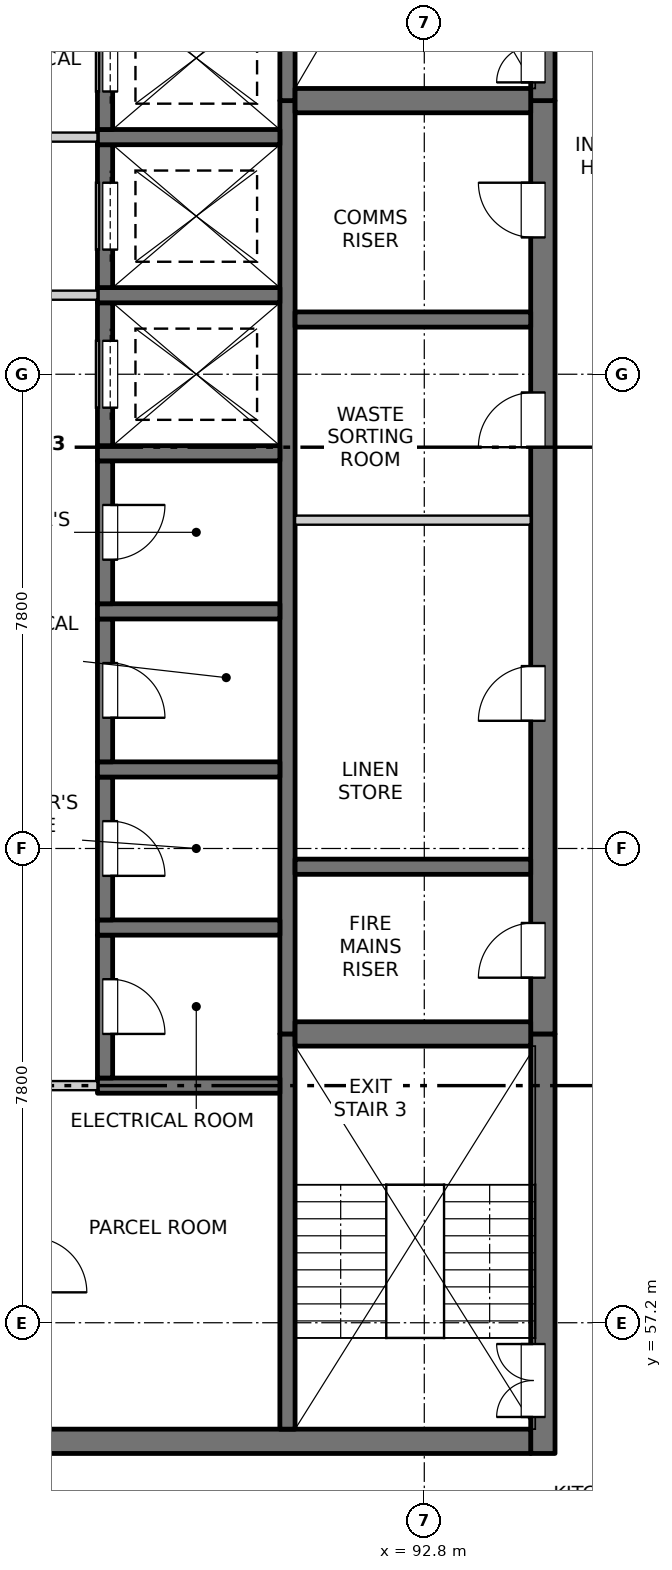
"""IFC4 building model, lengths in metres.
Left out: names, types, materials, properties, quantities, classifications, styles, units other than length and angle.
Written with IfcOpenShell. Run it as: python <this file> out.ifc"""

import sys

from ifc_helpers import new_model, si_unit, direction, frame, frame_2d, origin, place, context, subcontext, project, spatial, rectangle, extrude, element, fill, save


model = new_model("IFC4")
c1 = context("Model", 3, precision=1e-05, world=origin(), true_north=direction((0.0, 1.0)))
c2 = subcontext(c1, "Body", "Model", "MODEL_VIEW")
j1 = project(units=[si_unit("LENGTHUNIT", "METRE"), si_unit("PLANEANGLEUNIT", "RADIAN")], contexts=[c1])
p1 = place(None, origin())
s1 = spatial("IfcSite", under=j1, at=p1, CompositionType="ELEMENT")
p2 = place(p1, origin())
s2 = spatial("IfcBuilding", under=s1, at=p2, CompositionType="ELEMENT")
p3 = place(p2, frame((0.0, 0.0, 204.1)))
s3 = spatial("IfcBuildingStorey", under=s2, at=p3, CompositionType="ELEMENT", Elevation=204.1)
p4 = place(p3, frame((94.75, 55.05, -0.25), z_axis=(0.0, 0.0, 1.0), x_axis=(0.0, 1.0, 0.0)))
e1 = element("IfcWall", 1, at=p4, inside=s3, PredefinedType="SOLIDWALL", context=c2, shape_type="SweptSolid", body=[
    extrude(rectangle(XDim=6.9, YDim=0.4, at=frame_2d((3.45, 0.0))), origin(), (0.0, 0.0, 1.0), 3.4),
])
p5 = place(p4, frame((0.6, 0.0, 0.25)))
e2 = element("IfcOpeningElement", 2, at=p5, cuts=e1, PredefinedType="OPENING", context=c2, shape_type="SweptSolid", body=[
    extrude(rectangle(XDim=1.2, YDim=2.1, at=frame_2d((0.6, 1.05))), frame((0.0, 0.21, 0.0), z_axis=(0.0, -1.0, 0.0), x_axis=(1.0, 0.0, 0.0)), (0.0, 0.0, 1.0), 0.42),
])
p6 = place(p3, frame((94.75, 61.95, -0.25), z_axis=(0.0, 0.0, 1.0), x_axis=(0.0, 1.0, 0.0)))
e3 = element("IfcWall", 3, at=p6, inside=s3, PredefinedType="SOLIDWALL", context=c2, shape_type="SweptSolid", body=[
    extrude(rectangle(XDim=15.35, YDim=0.4, at=frame_2d((7.675, 0.0))), origin(), (0.0, 0.0, 1.0), 3.4),
])
p7 = place(p6, frame((0.925, 0.0, 0.25)))
e4 = element("IfcOpeningElement", 4, at=p7, cuts=e3, PredefinedType="OPENING", context=c2, shape_type="SweptSolid", body=[
    extrude(rectangle(XDim=0.9, YDim=2.1, at=frame_2d((0.45, 1.05))), frame((0.0, 0.21, 0.0), z_axis=(0.0, -1.0, 0.0), x_axis=(1.0, 0.0, 0.0)), (0.0, 0.0, 1.0), 0.42),
])
p8 = place(p6, frame((5.15, 0.0, 0.25)))
e5 = element("IfcOpeningElement", 5, at=p8, cuts=e3, PredefinedType="OPENING", context=c2, shape_type="SweptSolid", body=[
    extrude(rectangle(XDim=0.9, YDim=2.1, at=frame_2d((0.45, 1.05))), frame((0.0, 0.21, 0.0), z_axis=(0.0, -1.0, 0.0), x_axis=(1.0, 0.0, 0.0)), (0.0, 0.0, 1.0), 0.42),
])
p9 = place(p6, frame((9.65, 0.0, 0.25)))
e6 = element("IfcOpeningElement", 6, at=p9, cuts=e3, PredefinedType="OPENING", context=c2, shape_type="SweptSolid", body=[
    extrude(rectangle(XDim=0.9, YDim=2.1, at=frame_2d((0.45, 1.05))), frame((0.0, 0.21, 0.0), z_axis=(0.0, -1.0, 0.0), x_axis=(1.0, 0.0, 0.0)), (0.0, 0.0, 1.0), 0.42),
])
p10 = place(p6, frame((13.1, 0.0, 0.25)))
e7 = element("IfcOpeningElement", 7, at=p10, cuts=e3, PredefinedType="OPENING", context=c2, shape_type="SweptSolid", body=[
    extrude(rectangle(XDim=0.9, YDim=2.1, at=frame_2d((0.45, 1.05))), frame((0.0, 0.21, 0.0), z_axis=(0.0, -1.0, 0.0), x_axis=(1.0, 0.0, 0.0)), (0.0, 0.0, 1.0), 0.42),
])
p11 = place(p3, frame((94.75, 77.3, -0.25), z_axis=(0.0, 0.0, 1.0), x_axis=(0.0, 1.0, 0.0)))
e8 = element("IfcWall", 8, at=p11, inside=s3, PredefinedType="SOLIDWALL", context=c2, shape_type="SweptSolid", body=[
    extrude(rectangle(XDim=7.4, YDim=0.4, at=frame_2d((3.7, 0.0))), origin(), (0.0, 0.0, 1.0), 3.4),
])
p12 = place(p11, frame((0.3, 0.0, 0.25)))
e9 = element("IfcOpeningElement", 9, at=p12, cuts=e8, PredefinedType="OPENING", context=c2, shape_type="SweptSolid", body=[
    extrude(rectangle(XDim=1.2, YDim=2.1, at=frame_2d((0.6, 1.05))), frame((0.0, 0.21, 0.0), z_axis=(0.0, -1.0, 0.0), x_axis=(1.0, 0.0, 0.0)), (0.0, 0.0, 1.0), 0.42),
])
p13 = place(p3, frame((75.45, 55.25, -0.25), z_axis=(0.0, 0.0, 1.0), x_axis=(1.0, 0.0, 0.0)))
e10 = element("IfcWall", 10, at=p13, inside=s3, PredefinedType="SOLIDWALL", context=c2, shape_type="SweptSolid", body=[
    extrude(rectangle(XDim=19.1, YDim=0.4, at=frame_2d((9.55, 0.0))), origin(), (0.0, 0.0, 1.0), 3.4),
])
p14 = place(p13, frame((8.8, 0.0, 0.25)))
e11 = element("IfcOpeningElement", 11, at=p14, cuts=e10, PredefinedType="OPENING", context=c2, shape_type="SweptSolid", body=[
    extrude(rectangle(XDim=1.5, YDim=2.1, at=frame_2d((0.75, 1.05))), frame((0.0, 0.21, 0.0), z_axis=(0.0, -1.0, 0.0), x_axis=(1.0, 0.0, 0.0)), (0.0, 0.0, 1.0), 0.42),
])
p15 = place(p3, frame((90.55, 55.45, -0.25), z_axis=(0.0, 0.0, 1.0), x_axis=(0.0, 1.0, 0.0)))
e12 = element("IfcWall", 12, at=p15, inside=s3, PredefinedType="SOLIDWALL", context=c2, shape_type="SweptSolid", body=[
    extrude(rectangle(XDim=6.5, YDim=0.25, at=frame_2d((3.25, 0.0))), origin(), (0.0, 0.0, 1.0), 3.4),
])
p16 = place(p3, frame((90.55, 61.95, -0.25), z_axis=(0.0, 0.0, 1.0), x_axis=(0.0, 1.0, 0.0)))
e13 = element("IfcWall", 13, at=p16, inside=s3, PredefinedType="SOLIDWALL", context=c2, shape_type="SweptSolid", body=[
    extrude(rectangle(XDim=15.35, YDim=0.25, at=frame_2d((7.675, 0.0))), origin(), (0.0, 0.0, 1.0), 3.4),
])
p17 = place(p3, frame((90.55, 77.3, -0.25), z_axis=(0.0, 0.0, 1.0), x_axis=(0.0, 1.0, 0.0)))
e14 = element("IfcWall", 14, at=p17, inside=s3, PredefinedType="SOLIDWALL", context=c2, shape_type="SweptSolid", body=[
    extrude(rectangle(XDim=7.0, YDim=0.25, at=frame_2d((3.5, 0.0))), origin(), (0.0, 0.0, 1.0), 3.4),
])
p18 = place(p3, frame((87.425, 61.1, -0.25), z_axis=(0.0, 0.0, 1.0), x_axis=(1.0, 0.0, 0.0)))
e15 = element("IfcWall", 15, at=p18, inside=s3, PredefinedType="SOLIDWALL", context=c2, shape_type="SweptSolid", body=[
    extrude(rectangle(XDim=3.0, YDim=0.25, at=frame_2d((1.5, 0.0))), origin(), (0.0, 0.0, 1.0), 3.4),
])
p19 = place(p3, frame((87.55, 61.225, -0.25), z_axis=(0.0, 0.0, 1.0), x_axis=(0.0, 1.0, 0.0)))
e16 = element("IfcWall", 16, at=p19, inside=s3, PredefinedType="SOLIDWALL", context=c2, shape_type="SweptSolid", body=[
    extrude(rectangle(XDim=2.35, YDim=0.25, at=frame_2d((1.175, 0.0))), origin(), (0.0, 0.0, 1.0), 3.4),
])
p20 = place(p19, frame((0.725, 0.0, 0.25)))
e17 = element("IfcOpeningElement", 17, at=p20, cuts=e16, PredefinedType="OPENING", context=c2, shape_type="SweptSolid", body=[
    extrude(rectangle(XDim=0.9, YDim=2.1, at=frame_2d((0.45, 1.05))), frame((0.0, 0.135, 0.0), z_axis=(0.0, -1.0, 0.0), x_axis=(1.0, 0.0, 0.0)), (0.0, 0.0, 1.0), 0.27),
])
p21 = place(p3, frame((87.425, 63.7, -0.25), z_axis=(0.0, 0.0, 1.0), x_axis=(1.0, 0.0, 0.0)))
e18 = element("IfcWall", 18, at=p21, inside=s3, PredefinedType="SOLIDWALL", context=c2, shape_type="SweptSolid", body=[
    extrude(rectangle(XDim=3.0, YDim=0.25, at=frame_2d((1.5, 0.0))), origin(), (0.0, 0.0, 1.0), 3.4),
])
p22 = place(p3, frame((87.55, 63.825, -0.25), z_axis=(0.0, 0.0, 1.0), x_axis=(0.0, 1.0, 0.0)))
e19 = element("IfcWall", 19, at=p22, inside=s3, PredefinedType="SOLIDWALL", context=c2, shape_type="SweptSolid", body=[
    extrude(rectangle(XDim=2.35, YDim=0.25, at=frame_2d((1.175, 0.0))), origin(), (0.0, 0.0, 1.0), 3.4),
])
p23 = place(p22, frame((0.725, 0.0, 0.25)))
e20 = element("IfcOpeningElement", 20, at=p23, cuts=e19, PredefinedType="OPENING", context=c2, shape_type="SweptSolid", body=[
    extrude(rectangle(XDim=0.9, YDim=2.1, at=frame_2d((0.45, 1.05))), frame((0.0, 0.135, 0.0), z_axis=(0.0, -1.0, 0.0), x_axis=(1.0, 0.0, 0.0)), (0.0, 0.0, 1.0), 0.27),
])
p24 = place(p3, frame((87.425, 66.3, -0.25), z_axis=(0.0, 0.0, 1.0), x_axis=(1.0, 0.0, 0.0)))
e21 = element("IfcWall", 21, at=p24, inside=s3, PredefinedType="SOLIDWALL", context=c2, shape_type="SweptSolid", body=[
    extrude(rectangle(XDim=3.0, YDim=0.25, at=frame_2d((1.5, 0.0))), origin(), (0.0, 0.0, 1.0), 3.4),
])
p25 = place(p3, frame((87.55, 66.425, -0.25), z_axis=(0.0, 0.0, 1.0), x_axis=(0.0, 1.0, 0.0)))
e22 = element("IfcWall", 22, at=p25, inside=s3, PredefinedType="SOLIDWALL", context=c2, shape_type="SweptSolid", body=[
    extrude(rectangle(XDim=2.35, YDim=0.25, at=frame_2d((1.175, 0.0))), origin(), (0.0, 0.0, 1.0), 3.4),
])
p26 = place(p25, frame((0.725, 0.0, 0.25)))
e23 = element("IfcOpeningElement", 23, at=p26, cuts=e22, PredefinedType="OPENING", context=c2, shape_type="SweptSolid", body=[
    extrude(rectangle(XDim=0.9, YDim=2.1, at=frame_2d((0.45, 1.05))), frame((0.0, 0.135, 0.0), z_axis=(0.0, -1.0, 0.0), x_axis=(1.0, 0.0, 0.0)), (0.0, 0.0, 1.0), 0.27),
])
p27 = place(p3, frame((87.425, 68.9, -0.25), z_axis=(0.0, 0.0, 1.0), x_axis=(1.0, 0.0, 0.0)))
e24 = element("IfcWall", 24, at=p27, inside=s3, PredefinedType="SOLIDWALL", context=c2, shape_type="SweptSolid", body=[
    extrude(rectangle(XDim=3.0, YDim=0.25, at=frame_2d((1.5, 0.0))), origin(), (0.0, 0.0, 1.0), 3.4),
])
p28 = place(p3, frame((87.55, 69.025, -0.25), z_axis=(0.0, 0.0, 1.0), x_axis=(0.0, 1.0, 0.0)))
e25 = element("IfcWall", 25, at=p28, inside=s3, PredefinedType="SOLIDWALL", context=c2, shape_type="SweptSolid", body=[
    extrude(rectangle(XDim=2.35, YDim=0.25, at=frame_2d((1.175, 0.0))), origin(), (0.0, 0.0, 1.0), 3.4),
])
p29 = place(p28, frame((0.725, 0.0, 0.25)))
e26 = element("IfcOpeningElement", 26, at=p29, cuts=e25, PredefinedType="OPENING", context=c2, shape_type="SweptSolid", body=[
    extrude(rectangle(XDim=0.9, YDim=2.1, at=frame_2d((0.45, 1.05))), frame((0.0, 0.135, 0.0), z_axis=(0.0, -1.0, 0.0), x_axis=(1.0, 0.0, 0.0)), (0.0, 0.0, 1.0), 0.27),
])
p30 = place(p3, frame((87.425, 71.5, -0.25), z_axis=(0.0, 0.0, 1.0), x_axis=(1.0, 0.0, 0.0)))
e27 = element("IfcWall", 27, at=p30, inside=s3, PredefinedType="SOLIDWALL", context=c2, shape_type="SweptSolid", body=[
    extrude(rectangle(XDim=3.0, YDim=0.25, at=frame_2d((1.5, 0.0))), origin(), (0.0, 0.0, 1.0), 3.4),
])
p31 = place(p3, frame((87.55, 71.625, -0.25), z_axis=(0.0, 0.0, 1.0), x_axis=(0.0, 1.0, 0.0)))
e28 = element("IfcWall", 28, at=p31, inside=s3, PredefinedType="SOLIDWALL", context=c2, shape_type="SweptSolid", body=[
    extrude(rectangle(XDim=2.35, YDim=0.25, at=frame_2d((1.175, 0.0))), origin(), (0.0, 0.0, 1.0), 3.4),
])
p32 = place(p31, frame((0.625, 0.0, 0.25)))
e29 = element("IfcOpeningElement", 29, at=p32, cuts=e28, PredefinedType="OPENING", context=c2, shape_type="SweptSolid", body=[
    extrude(rectangle(XDim=1.1, YDim=2.1, at=frame_2d((0.55, 1.05))), frame((0.0, 0.135, 0.0), z_axis=(0.0, -1.0, 0.0), x_axis=(1.0, 0.0, 0.0)), (0.0, 0.0, 1.0), 0.27),
])
p33 = place(p3, frame((87.425, 74.1, -0.25), z_axis=(0.0, 0.0, 1.0), x_axis=(1.0, 0.0, 0.0)))
e30 = element("IfcWall", 30, at=p33, inside=s3, PredefinedType="SOLIDWALL", context=c2, shape_type="SweptSolid", body=[
    extrude(rectangle(XDim=3.0, YDim=0.25, at=frame_2d((1.5, 0.0))), origin(), (0.0, 0.0, 1.0), 3.4),
])
p34 = place(p3, frame((87.55, 74.225, -0.25), z_axis=(0.0, 0.0, 1.0), x_axis=(0.0, 1.0, 0.0)))
e31 = element("IfcWall", 31, at=p34, inside=s3, PredefinedType="SOLIDWALL", context=c2, shape_type="SweptSolid", body=[
    extrude(rectangle(XDim=2.35, YDim=0.25, at=frame_2d((1.175, 0.0))), origin(), (0.0, 0.0, 1.0), 3.4),
])
p35 = place(p34, frame((0.625, 0.0, 0.25)))
e32 = element("IfcOpeningElement", 32, at=p35, cuts=e31, PredefinedType="OPENING", context=c2, shape_type="SweptSolid", body=[
    extrude(rectangle(XDim=1.1, YDim=2.1, at=frame_2d((0.55, 1.05))), frame((0.0, 0.135, 0.0), z_axis=(0.0, -1.0, 0.0), x_axis=(1.0, 0.0, 0.0)), (0.0, 0.0, 1.0), 0.27),
])
p36 = place(p3, frame((87.425, 76.7, -0.25), z_axis=(0.0, 0.0, 1.0), x_axis=(1.0, 0.0, 0.0)))
e33 = element("IfcWall", 33, at=p36, inside=s3, PredefinedType="SOLIDWALL", context=c2, shape_type="SweptSolid", body=[
    extrude(rectangle(XDim=3.0, YDim=0.25, at=frame_2d((1.5, 0.0))), origin(), (0.0, 0.0, 1.0), 3.4),
])
p37 = place(p3, frame((87.55, 76.825, -0.25), z_axis=(0.0, 0.0, 1.0), x_axis=(0.0, 1.0, 0.0)))
e34 = element("IfcWall", 34, at=p37, inside=s3, PredefinedType="SOLIDWALL", context=c2, shape_type="SweptSolid", body=[
    extrude(rectangle(XDim=2.35, YDim=0.25, at=frame_2d((1.175, 0.0))), origin(), (0.0, 0.0, 1.0), 3.4),
])
p38 = place(p37, frame((0.625, 0.0, 0.25)))
e35 = element("IfcOpeningElement", 35, at=p38, cuts=e34, PredefinedType="OPENING", context=c2, shape_type="SweptSolid", body=[
    extrude(rectangle(XDim=1.1, YDim=2.1, at=frame_2d((0.55, 1.05))), frame((0.0, 0.135, 0.0), z_axis=(0.0, -1.0, 0.0), x_axis=(1.0, 0.0, 0.0)), (0.0, 0.0, 1.0), 0.27),
])
p39 = place(p3, frame((90.675, 61.95, -0.25), z_axis=(0.0, 0.0, 1.0), x_axis=(1.0, 0.0, 0.0)))
e36 = element("IfcWall", 36, at=p39, inside=s3, PredefinedType="SOLIDWALL", context=c2, shape_type="SweptSolid", body=[
    extrude(rectangle(XDim=3.875, YDim=0.4, at=frame_2d((1.938, 0.0))), origin(), (0.0, 0.0, 1.0), 3.4),
])
for number, where, z_axis, x_axis in (
    (37, (90.675, 64.7, -0.25), (0.0, 0.0, 1.0), (1.0, 0.0, 0.0)),
    (38, (90.675, 73.7, -0.25), (0.0, 0.0, 1.0), (1.0, 0.0, 0.0)),
):
    element("IfcWall", number, at=place(p3, frame(where, z_axis=z_axis, x_axis=x_axis)), inside=s3, PredefinedType="SOLIDWALL", context=c2, shape_type="SweptSolid", body=[
        extrude(rectangle(XDim=3.875, YDim=0.25, at=frame_2d((1.938, 0.0))), origin(), (0.0, 0.0, 1.0), 3.4),
    ])
p40 = place(p3, frame((90.675, 77.3, -0.25), z_axis=(0.0, 0.0, 1.0), x_axis=(1.0, 0.0, 0.0)))
e39 = element("IfcWall", 39, at=p40, inside=s3, PredefinedType="SOLIDWALL", context=c2, shape_type="SweptSolid", body=[
    extrude(rectangle(XDim=3.875, YDim=0.4, at=frame_2d((1.938, 0.0))), origin(), (0.0, 0.0, 1.0), 3.4),
])
p41 = place(p3, frame((82.575, 61.1, 0.0), z_axis=(0.0, 0.0, 1.0), x_axis=(1.0, 0.0, 0.0)))
e40 = element("IfcWall", 40, at=p41, inside=s3, PredefinedType="PARTITIONING", context=c2, shape_type="SweptSolid", body=[
    extrude(rectangle(XDim=4.85, YDim=0.15, at=frame_2d((2.425, 0.0))), origin(), (0.0, 0.0, 1.0), 3.15),
])
p42 = place(p41, frame((1.525, 0.0, 0.0)))
e41 = element("IfcOpeningElement", 41, at=p42, cuts=e40, PredefinedType="OPENING", context=c2, shape_type="SweptSolid", body=[
    extrude(rectangle(XDim=1.8, YDim=2.1, at=frame_2d((0.9, 1.05))), frame((0.0, 0.085, 0.0), z_axis=(0.0, -1.0, 0.0), x_axis=(1.0, 0.0, 0.0)), (0.0, 0.0, 1.0), 0.17),
])
p43 = place(p3, frame((90.675, 70.4, 0.0), z_axis=(0.0, 0.0, 1.0), x_axis=(1.0, 0.0, 0.0)))
e42 = element("IfcWall", 42, at=p43, inside=s3, PredefinedType="PARTITIONING", context=c2, shape_type="SweptSolid", body=[
    extrude(rectangle(XDim=3.875, YDim=0.15, at=frame_2d((1.938, 0.0))), origin(), (0.0, 0.0, 1.0), 3.15),
])
p44 = place(p3, frame((82.575, 74.1, 0.0), z_axis=(0.0, 0.0, 1.0), x_axis=(1.0, 0.0, 0.0)))
e43 = element("IfcWall", 43, at=p44, inside=s3, PredefinedType="PARTITIONING", context=c2, shape_type="SweptSolid", body=[
    extrude(rectangle(XDim=4.85, YDim=0.15, at=frame_2d((2.425, 0.0))), origin(), (0.0, 0.0, 1.0), 3.15),
])
p45 = place(p44, frame((1.525, 0.0, 0.0)))
e44 = element("IfcOpeningElement", 44, at=p45, cuts=e43, PredefinedType="OPENING", context=c2, shape_type="SweptSolid", body=[
    extrude(rectangle(XDim=1.8, YDim=2.1, at=frame_2d((0.9, 1.05))), frame((0.0, 0.085, 0.0), z_axis=(0.0, -1.0, 0.0), x_axis=(1.0, 0.0, 0.0)), (0.0, 0.0, 1.0), 0.17),
])
p46 = place(p3, frame((82.575, 76.7, 0.0), z_axis=(0.0, 0.0, 1.0), x_axis=(1.0, 0.0, 0.0)))
e45 = element("IfcWall", 45, at=p46, inside=s3, PredefinedType="PARTITIONING", context=c2, shape_type="SweptSolid", body=[
    extrude(rectangle(XDim=4.85, YDim=0.15, at=frame_2d((2.425, 0.0))), origin(), (0.0, 0.0, 1.0), 3.15),
])
p47 = place(p46, frame((1.525, 0.0, 0.0)))
e46 = element("IfcOpeningElement", 46, at=p47, cuts=e45, PredefinedType="OPENING", context=c2, shape_type="SweptSolid", body=[
    extrude(rectangle(XDim=1.8, YDim=2.1, at=frame_2d((0.9, 1.05))), frame((0.0, 0.085, 0.0), z_axis=(0.0, -1.0, 0.0), x_axis=(1.0, 0.0, 0.0)), (0.0, 0.0, 1.0), 0.17),
])
p48 = place(p5, origin())
e47 = element("IfcDoor", 47, at=p48, inside=s3, OperationType="DOUBLE_DOOR_SINGLE_SWING", PredefinedType="DOOR", context=c2, shape_type="SweptSolid", body=[
    extrude(rectangle(XDim=1.2, YDim=2.1, at=frame_2d((0.6, 1.05))), frame((0.0, 0.185, 0.0), z_axis=(0.0, -1.0, 0.0), x_axis=(1.0, 0.0, 0.0)), (0.0, 0.0, 1.0), 0.05),
])
fill(e2, e47)
p49 = place(p20, origin())
e48 = element("IfcDoor", 48, at=p49, inside=s3, OperationType="SINGLE_SWING_RIGHT", PredefinedType="DOOR", context=c2, shape_type="SweptSolid", body=[
    extrude(rectangle(XDim=0.9, YDim=2.1, at=frame_2d((0.45, 1.05))), frame((0.0, -0.06, 0.0), z_axis=(0.0, -1.0, 0.0), x_axis=(1.0, 0.0, 0.0)), (0.0, 0.0, 1.0), 0.05),
])
fill(e17, e48)
p50 = place(p7, origin())
e49 = element("IfcDoor", 49, at=p50, inside=s3, OperationType="SINGLE_SWING_LEFT", PredefinedType="DOOR", context=c2, shape_type="SweptSolid", body=[
    extrude(rectangle(XDim=0.9, YDim=2.1, at=frame_2d((0.45, 1.05))), frame((0.0, 0.185, 0.0), z_axis=(0.0, -1.0, 0.0), x_axis=(1.0, 0.0, 0.0)), (0.0, 0.0, 1.0), 0.05),
])
fill(e4, e49)
p51 = place(p23, origin())
e50 = element("IfcDoor", 50, at=p51, inside=s3, OperationType="SINGLE_SWING_RIGHT", PredefinedType="DOOR", context=c2, shape_type="SweptSolid", body=[
    extrude(rectangle(XDim=0.9, YDim=2.1, at=frame_2d((0.45, 1.05))), frame((0.0, -0.06, 0.0), z_axis=(0.0, -1.0, 0.0), x_axis=(1.0, 0.0, 0.0)), (0.0, 0.0, 1.0), 0.05),
])
fill(e20, e50)
p52 = place(p8, origin())
e51 = element("IfcDoor", 51, at=p52, inside=s3, OperationType="SINGLE_SWING_LEFT", PredefinedType="DOOR", context=c2, shape_type="SweptSolid", body=[
    extrude(rectangle(XDim=0.9, YDim=2.1, at=frame_2d((0.45, 1.05))), frame((0.0, 0.185, 0.0), z_axis=(0.0, -1.0, 0.0), x_axis=(1.0, 0.0, 0.0)), (0.0, 0.0, 1.0), 0.05),
])
fill(e5, e51)
p53 = place(p26, origin())
e52 = element("IfcDoor", 52, at=p53, inside=s3, OperationType="SINGLE_SWING_RIGHT", PredefinedType="DOOR", context=c2, shape_type="SweptSolid", body=[
    extrude(rectangle(XDim=0.9, YDim=2.1, at=frame_2d((0.45, 1.05))), frame((0.0, -0.06, 0.0), z_axis=(0.0, -1.0, 0.0), x_axis=(1.0, 0.0, 0.0)), (0.0, 0.0, 1.0), 0.05),
])
fill(e23, e52)
p54 = place(p29, origin())
e53 = element("IfcDoor", 53, at=p54, inside=s3, OperationType="SINGLE_SWING_LEFT", PredefinedType="DOOR", context=c2, shape_type="SweptSolid", body=[
    extrude(rectangle(XDim=0.9, YDim=2.1, at=frame_2d((0.45, 1.05))), frame((0.0, -0.06, 0.0), z_axis=(0.0, -1.0, 0.0), x_axis=(1.0, 0.0, 0.0)), (0.0, 0.0, 1.0), 0.05),
])
fill(e26, e53)
p55 = place(p9, origin())
e54 = element("IfcDoor", 54, at=p55, inside=s3, OperationType="SINGLE_SWING_LEFT", PredefinedType="DOOR", context=c2, shape_type="SweptSolid", body=[
    extrude(rectangle(XDim=0.9, YDim=2.1, at=frame_2d((0.45, 1.05))), frame((0.0, 0.185, 0.0), z_axis=(0.0, -1.0, 0.0), x_axis=(1.0, 0.0, 0.0)), (0.0, 0.0, 1.0), 0.05),
])
fill(e6, e54)
p56 = place(p32, origin())
e55 = element("IfcDoor", 55, at=p56, inside=s3, OperationType="SLIDING_TO_LEFT", PredefinedType="DOOR", context=c2, shape_type="SweptSolid", body=[
    extrude(rectangle(XDim=1.1, YDim=2.1, at=frame_2d((0.55, 1.05))), frame((0.0, -0.06, 0.0), z_axis=(0.0, -1.0, 0.0), x_axis=(1.0, 0.0, 0.0)), (0.0, 0.0, 1.0), 0.05),
])
fill(e29, e55)
p57 = place(p35, origin())
e56 = element("IfcDoor", 56, at=p57, inside=s3, OperationType="SLIDING_TO_LEFT", PredefinedType="DOOR", context=c2, shape_type="SweptSolid", body=[
    extrude(rectangle(XDim=1.1, YDim=2.1, at=frame_2d((0.55, 1.05))), frame((0.0, -0.06, 0.0), z_axis=(0.0, -1.0, 0.0), x_axis=(1.0, 0.0, 0.0)), (0.0, 0.0, 1.0), 0.05),
])
fill(e32, e56)
p58 = place(p10, origin())
e57 = element("IfcDoor", 57, at=p58, inside=s3, OperationType="SINGLE_SWING_RIGHT", PredefinedType="DOOR", context=c2, shape_type="SweptSolid", body=[
    extrude(rectangle(XDim=0.9, YDim=2.1, at=frame_2d((0.45, 1.05))), frame((0.0, 0.185, 0.0), z_axis=(0.0, -1.0, 0.0), x_axis=(1.0, 0.0, 0.0)), (0.0, 0.0, 1.0), 0.05),
])
fill(e7, e57)
p59 = place(p38, origin())
e58 = element("IfcDoor", 58, at=p59, inside=s3, OperationType="SLIDING_TO_LEFT", PredefinedType="DOOR", context=c2, shape_type="SweptSolid", body=[
    extrude(rectangle(XDim=1.1, YDim=2.1, at=frame_2d((0.55, 1.05))), frame((0.0, -0.06, 0.0), z_axis=(0.0, -1.0, 0.0), x_axis=(1.0, 0.0, 0.0)), (0.0, 0.0, 1.0), 0.05),
])
fill(e35, e58)
p60 = place(p12, origin())
e59 = element("IfcDoor", 59, at=p60, inside=s3, OperationType="DOUBLE_DOOR_SINGLE_SWING", PredefinedType="DOOR", context=c2, shape_type="SweptSolid", body=[
    extrude(rectangle(XDim=1.2, YDim=2.1, at=frame_2d((0.6, 1.05))), frame((0.0, 0.185, 0.0), z_axis=(0.0, -1.0, 0.0), x_axis=(1.0, 0.0, 0.0)), (0.0, 0.0, 1.0), 0.05),
])
fill(e9, e59)
save(model, sys.argv[1])
